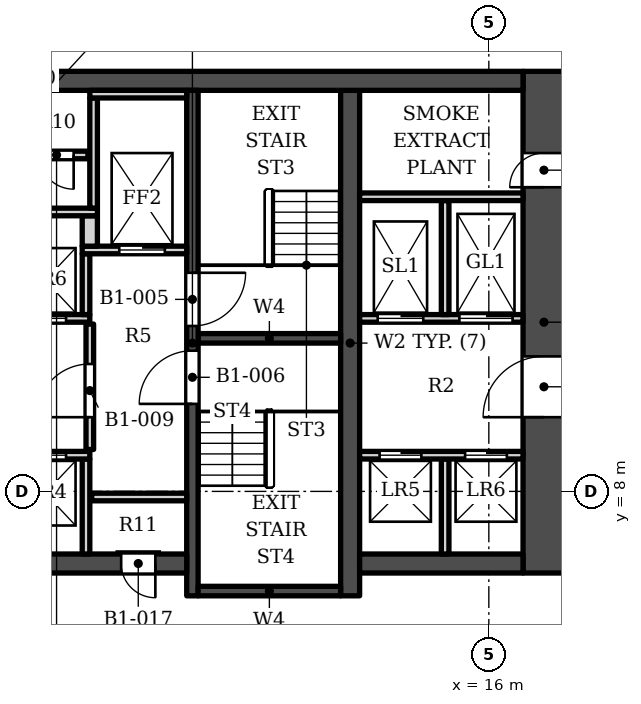
"""IFC4 building model, lengths in metres.
Left out: names, types, materials, properties, quantities, classifications, styles, units other than length and angle.
Written with IfcOpenShell. Run it as: python <this file> out.ifc"""

import sys

from ifc_helpers import new_model, si_unit, direction, frame, frame_2d, origin, place, context, subcontext, project, spatial, rectangle, extrude, element, fill, save


model = new_model("IFC4")
c1 = context("Model", 3, precision=1e-05, world=origin(), true_north=direction((0.0, 1.0)))
c2 = subcontext(c1, "Body", "Model", "MODEL_VIEW")
j1 = project(units=[si_unit("LENGTHUNIT", "METRE"), si_unit("PLANEANGLEUNIT", "RADIAN")], contexts=[c1])
p1 = place(None, origin())
s1 = spatial("IfcSite", under=j1, at=p1, CompositionType="ELEMENT")
p2 = place(p1, origin())
s2 = spatial("IfcBuilding", under=s1, at=p2, CompositionType="ELEMENT")
p3 = place(p2, frame((0.0, 0.0, -5.0)))
s3 = spatial("IfcBuildingStorey", under=s2, at=p3, CompositionType="ELEMENT", Elevation=-5.0)
p4 = place(p3, frame((-16.9, 18.802, 0.0), z_axis=(0.0, 0.0, 1.0), x_axis=(1.0, 0.0, 0.0)))
e1 = element("IfcWall", 1, at=p4, inside=s3, PredefinedType="SHEAR", context=c2, shape_type="SweptSolid", body=[
    extrude(rectangle(XDim=33.8, YDim=0.5, at=frame_2d((16.9, 0.0))), origin(), (0.0, 0.0, 1.0), 5.0),
])
p5 = place(p3, frame((12.35, 5.253, 0.0), z_axis=(0.0, 0.0, 1.0), x_axis=(0.0, 1.0, 0.0)))
e2 = element("IfcWall", 2, at=p5, inside=s3, PredefinedType="SHEAR", context=c2, shape_type="SweptSolid", body=[
    extrude(rectangle(XDim=13.3, YDim=0.5, at=frame_2d((6.65, 0.0))), origin(), (0.0, 0.0, 1.0), 5.0),
])
p6 = place(p3, frame((8.2, 5.253, 0.0), z_axis=(0.0, 0.0, 1.0), x_axis=(0.0, 1.0, 0.0)))
e3 = element("IfcWall", 3, at=p6, inside=s3, PredefinedType="SHEAR", context=c2, shape_type="SweptSolid", body=[
    extrude(rectangle(XDim=13.3, YDim=0.3, at=frame_2d((6.65, 0.0))), origin(), (0.0, 0.0, 1.0), 5.0),
])
p7 = place(p6, frame((7.1, 0.0, 0.0)))
e4 = element("IfcOpeningElement", 4, at=p7, cuts=e3, PredefinedType="OPENING", context=c2, shape_type="SweptSolid", body=[
    extrude(rectangle(XDim=1.4, YDim=2.1, at=frame_2d((0.7, 1.05))), frame((0.0, 0.16, 0.0), z_axis=(0.0, -1.0, 0.0), x_axis=(1.0, 0.0, 0.0)), (0.0, 0.0, 1.0), 0.32),
])
p8 = place(p6, frame((5.05, 0.0, 0.0)))
e5 = element("IfcOpeningElement", 5, at=p8, cuts=e3, PredefinedType="OPENING", context=c2, shape_type="SweptSolid", body=[
    extrude(rectangle(XDim=1.4, YDim=2.1, at=frame_2d((0.7, 1.05))), frame((0.0, 0.16, 0.0), z_axis=(0.0, -1.0, 0.0), x_axis=(1.0, 0.0, 0.0)), (0.0, 0.0, 1.0), 0.32),
])
for number, where, z_axis, x_axis in (
    (6, (8.35, 12.028, 0.0), (0.0, 0.0, 1.0), (1.0, 0.0, 0.0)),
    (7, (8.35, 5.378, 0.0), (0.0, 0.0, 1.0), (1.0, 0.0, 0.0)),
):
    element("IfcWall", number, at=place(p3, frame(where, z_axis=z_axis, x_axis=x_axis)), inside=s3, PredefinedType="SHEAR", context=c2, shape_type="SweptSolid", body=[
        extrude(rectangle(XDim=3.75, YDim=0.25, at=frame_2d((1.875, 0.0))), origin(), (0.0, 0.0, 1.0), 5.0),
    ])
p9 = place(p3, frame((1.0, 6.103, 0.0), z_axis=(0.0, 0.0, 1.0), x_axis=(1.0, 0.0, 0.0)))
e8 = element("IfcWall", 8, at=p9, inside=s3, PredefinedType="SHEAR", context=c2, shape_type="SweptSolid", body=[
    extrude(rectangle(XDim=7.05, YDim=0.5, at=frame_2d((3.525, 0.0))), origin(), (0.0, 0.0, 1.0), 5.0),
])
p10 = place(p9, frame((5.325, 0.0, 0.0)))
e9 = element("IfcOpeningElement", 9, at=p10, cuts=e8, PredefinedType="OPENING", context=c2, shape_type="SweptSolid", body=[
    extrude(rectangle(XDim=0.9, YDim=2.1, at=frame_2d((0.45, 1.05))), frame((0.0, 0.26, 0.0), z_axis=(0.0, -1.0, 0.0), x_axis=(1.0, 0.0, 0.0)), (0.0, 0.0, 1.0), 0.52),
])
p11 = place(p3, frame((12.6, 6.103, 0.0), z_axis=(0.0, 0.0, 1.0), x_axis=(1.0, 0.0, 0.0)))
e10 = element("IfcWall", 10, at=p11, inside=s3, PredefinedType="SHEAR", context=c2, shape_type="SweptSolid", body=[
    extrude(rectangle(XDim=4.3, YDim=0.5, at=frame_2d((2.15, 0.0))), origin(), (0.0, 0.0, 1.0), 5.0),
])
p12 = place(p3, frame((17.45, 5.853, 0.0), z_axis=(0.0, 0.0, 1.0), x_axis=(0.0, 1.0, 0.0)))
e11 = element("IfcWall", 11, at=p12, inside=s3, PredefinedType="SHEAR", context=c2, shape_type="SweptSolid", body=[
    extrude(rectangle(XDim=13.2, YDim=1.1, at=frame_2d((6.6, 0.0))), origin(), (0.0, 0.0, 1.0), 5.0),
])
p13 = place(p12, frame((4.1, 0.0, 0.0)))
e12 = element("IfcOpeningElement", 12, at=p13, cuts=e11, PredefinedType="OPENING", context=c2, shape_type="SweptSolid", body=[
    extrude(rectangle(XDim=1.6, YDim=2.1, at=frame_2d((0.8, 1.05))), frame((0.0, 0.56, 0.0), z_axis=(0.0, -1.0, 0.0), x_axis=(1.0, 0.0, 0.0)), (0.0, 0.0, 1.0), 1.12),
])
p14 = place(p12, frame((10.15, 0.0, 0.0)))
e13 = element("IfcOpeningElement", 13, at=p14, cuts=e11, PredefinedType="OPENING", context=c2, shape_type="SweptSolid", body=[
    extrude(rectangle(XDim=0.9, YDim=2.1, at=frame_2d((0.45, 1.05))), frame((0.0, 0.56, 0.0), z_axis=(0.0, -1.0, 0.0), x_axis=(1.0, 0.0, 0.0)), (0.0, 0.0, 1.0), 1.12),
])
for number, where, z_axis, x_axis in (
    (14, (5.4, 6.353, 0.0), (0.0, 0.0, 1.0), (0.0, 1.0, 0.0)),
    (15, (14.85, 6.353, 0.0), (0.0, 0.0, 1.0), (0.0, 1.0, 0.0)),
    (16, (5.55, 7.853, 0.0), (0.0, 0.0, 1.0), (1.0, 0.0, 0.0)),
):
    element("IfcWall", number, at=place(p3, frame(where, z_axis=z_axis, x_axis=x_axis)), inside=s3, PredefinedType="SOLIDWALL", context=c2, shape_type="SweptSolid", body=[
        extrude(rectangle(XDim=2.5, YDim=0.2, at=frame_2d((1.25, 0.0))), origin(), (0.0, 0.0, 1.0), 4.45),
    ])
p15 = place(p3, frame((1.0, 8.953, 0.0), z_axis=(0.0, 0.0, 1.0), x_axis=(1.0, 0.0, 0.0)))
e17 = element("IfcWall", 17, at=p15, inside=s3, PredefinedType="SOLIDWALL", context=c2, shape_type="SweptSolid", body=[
    extrude(rectangle(XDim=4.5, YDim=0.2, at=frame_2d((2.25, 0.0))), origin(), (0.0, 0.0, 1.0), 4.45),
])
p16 = place(p15, frame((0.625, 0.0, 0.0)))
e18 = element("IfcOpeningElement", 18, at=p16, cuts=e17, PredefinedType="OPENING", context=c2, shape_type="SweptSolid", body=[
    extrude(rectangle(XDim=1.1, YDim=2.1, at=frame_2d((0.55, 1.05))), frame((0.0, 0.11, 0.0), z_axis=(0.0, -1.0, 0.0), x_axis=(1.0, 0.0, 0.0)), (0.0, 0.0, 1.0), 0.22),
])
p17 = place(p15, frame((2.775, 0.0, 0.0)))
e19 = element("IfcOpeningElement", 19, at=p17, cuts=e17, PredefinedType="OPENING", context=c2, shape_type="SweptSolid", body=[
    extrude(rectangle(XDim=1.1, YDim=2.1, at=frame_2d((0.55, 1.05))), frame((0.0, 0.11, 0.0), z_axis=(0.0, -1.0, 0.0), x_axis=(1.0, 0.0, 0.0)), (0.0, 0.0, 1.0), 0.22),
])
p18 = place(p3, frame((12.6, 8.953, 0.0), z_axis=(0.0, 0.0, 1.0), x_axis=(1.0, 0.0, 0.0)))
e20 = element("IfcWall", 20, at=p18, inside=s3, PredefinedType="SOLIDWALL", context=c2, shape_type="SweptSolid", body=[
    extrude(rectangle(XDim=4.3, YDim=0.2, at=frame_2d((2.15, 0.0))), origin(), (0.0, 0.0, 1.0), 4.45),
])
p19 = place(p18, frame((0.525, 0.0, 0.0)))
e21 = element("IfcOpeningElement", 21, at=p19, cuts=e20, PredefinedType="OPENING", context=c2, shape_type="SweptSolid", body=[
    extrude(rectangle(XDim=1.1, YDim=2.1, at=frame_2d((0.55, 1.05))), frame((0.0, 0.11, 0.0), z_axis=(0.0, -1.0, 0.0), x_axis=(1.0, 0.0, 0.0)), (0.0, 0.0, 1.0), 0.22),
])
p20 = place(p18, frame((2.775, 0.0, 0.0)))
e22 = element("IfcOpeningElement", 22, at=p20, cuts=e20, PredefinedType="OPENING", context=c2, shape_type="SweptSolid", body=[
    extrude(rectangle(XDim=1.1, YDim=2.1, at=frame_2d((0.55, 1.05))), frame((0.0, 0.11, 0.0), z_axis=(0.0, -1.0, 0.0), x_axis=(1.0, 0.0, 0.0)), (0.0, 0.0, 1.0), 0.22),
])
p21 = place(p3, frame((5.5, 9.103, 0.0), z_axis=(0.0, 0.0, 1.0), x_axis=(0.0, 1.0, 0.0)))
e23 = element("IfcWall", 23, at=p21, inside=s3, PredefinedType="SOLIDWALL", context=c2, shape_type="SweptSolid", body=[
    extrude(rectangle(XDim=3.3, YDim=0.2, at=frame_2d((1.65, 0.0))), origin(), (0.0, 0.0, 1.0), 4.45),
])
p22 = place(p21, frame((0.85, 0.0, 0.0)))
e24 = element("IfcOpeningElement", 24, at=p22, cuts=e23, PredefinedType="OPENING", context=c2, shape_type="SweptSolid", body=[
    extrude(rectangle(XDim=1.4, YDim=2.1, at=frame_2d((0.7, 1.05))), frame((0.0, 0.11, 0.0), z_axis=(0.0, -1.0, 0.0), x_axis=(1.0, 0.0, 0.0)), (0.0, 0.0, 1.0), 0.22),
])
p23 = place(p3, frame((-1.5, 12.552, 0.0), z_axis=(0.0, 0.0, 1.0), x_axis=(1.0, 0.0, 0.0)))
e25 = element("IfcWall", 25, at=p23, inside=s3, PredefinedType="SOLIDWALL", context=c2, shape_type="SweptSolid", body=[
    extrude(rectangle(XDim=7.0, YDim=0.2, at=frame_2d((3.5, 0.0))), origin(), (0.0, 0.0, 1.0), 4.45),
])
p24 = place(p23, frame((3.075, 0.0, 0.0)))
e26 = element("IfcOpeningElement", 26, at=p24, cuts=e25, PredefinedType="OPENING", context=c2, shape_type="SweptSolid", body=[
    extrude(rectangle(XDim=1.1, YDim=2.1, at=frame_2d((0.55, 1.05))), frame((0.0, 0.11, 0.0), z_axis=(0.0, -1.0, 0.0), x_axis=(1.0, 0.0, 0.0)), (0.0, 0.0, 1.0), 0.22),
])
p25 = place(p23, frame((5.275, 0.0, 0.0)))
e27 = element("IfcOpeningElement", 27, at=p25, cuts=e25, PredefinedType="OPENING", context=c2, shape_type="SweptSolid", body=[
    extrude(rectangle(XDim=1.1, YDim=2.1, at=frame_2d((0.55, 1.05))), frame((0.0, 0.11, 0.0), z_axis=(0.0, -1.0, 0.0), x_axis=(1.0, 0.0, 0.0)), (0.0, 0.0, 1.0), 0.22),
])
p26 = place(p3, frame((12.6, 12.552, 0.0), z_axis=(0.0, 0.0, 1.0), x_axis=(1.0, 0.0, 0.0)))
e28 = element("IfcWall", 28, at=p26, inside=s3, PredefinedType="SOLIDWALL", context=c2, shape_type="SweptSolid", body=[
    extrude(rectangle(XDim=4.3, YDim=0.2, at=frame_2d((2.15, 0.0))), origin(), (0.0, 0.0, 1.0), 4.45),
])
p27 = place(p26, frame((0.475, 0.0, 0.0)))
e29 = element("IfcOpeningElement", 29, at=p27, cuts=e28, PredefinedType="OPENING", context=c2, shape_type="SweptSolid", body=[
    extrude(rectangle(XDim=1.2, YDim=2.1, at=frame_2d((0.6, 1.05))), frame((0.0, 0.11, 0.0), z_axis=(0.0, -1.0, 0.0), x_axis=(1.0, 0.0, 0.0)), (0.0, 0.0, 1.0), 0.22),
])
p28 = place(p26, frame((2.625, 0.0, 0.0)))
e30 = element("IfcOpeningElement", 30, at=p28, cuts=e28, PredefinedType="OPENING", context=c2, shape_type="SweptSolid", body=[
    extrude(rectangle(XDim=1.4, YDim=2.1, at=frame_2d((0.7, 1.05))), frame((0.0, 0.11, 0.0), z_axis=(0.0, -1.0, 0.0), x_axis=(1.0, 0.0, 0.0)), (0.0, 0.0, 1.0), 0.22),
])
p29 = place(p3, frame((5.4, 12.653, 0.0), z_axis=(0.0, 0.0, 1.0), x_axis=(0.0, 1.0, 0.0)))
e31 = element("IfcWall", 31, at=p29, inside=s3, PredefinedType="SOLIDWALL", context=c2, shape_type="SweptSolid", body=[
    extrude(rectangle(XDim=1.6, YDim=0.2, at=frame_2d((0.8, 0.0))), origin(), (0.0, 0.0, 1.0), 4.45),
])
p30 = place(p3, frame((14.85, 12.653, 0.0), z_axis=(0.0, 0.0, 1.0), x_axis=(0.0, 1.0, 0.0)))
e32 = element("IfcWall", 32, at=p30, inside=s3, PredefinedType="SOLIDWALL", context=c2, shape_type="SweptSolid", body=[
    extrude(rectangle(XDim=3.0, YDim=0.2, at=frame_2d((1.5, 0.0))), origin(), (0.0, 0.0, 1.0), 4.45),
])
p31 = place(p3, frame((5.3, 14.353, 0.0), z_axis=(0.0, 0.0, 1.0), x_axis=(1.0, 0.0, 0.0)))
e33 = element("IfcWall", 33, at=p31, inside=s3, PredefinedType="SOLIDWALL", context=c2, shape_type="SweptSolid", body=[
    extrude(rectangle(XDim=2.75, YDim=0.2, at=frame_2d((1.375, 0.0))), origin(), (0.0, 0.0, 1.0), 4.45),
])
p32 = place(p31, frame((0.975, 0.0, 0.0)))
e34 = element("IfcOpeningElement", 34, at=p32, cuts=e33, PredefinedType="OPENING", context=c2, shape_type="SweptSolid", body=[
    extrude(rectangle(XDim=1.2, YDim=2.1, at=frame_2d((0.6, 1.05))), frame((0.0, 0.11, 0.0), z_axis=(0.0, -1.0, 0.0), x_axis=(1.0, 0.0, 0.0)), (0.0, 0.0, 1.0), 0.22),
])
p33 = place(p3, frame((5.5, 14.453, 0.0), z_axis=(0.0, 0.0, 1.0), x_axis=(0.0, 1.0, 0.0)))
e35 = element("IfcWall", 35, at=p33, inside=s3, PredefinedType="SOLIDWALL", context=c2, shape_type="SweptSolid", body=[
    extrude(rectangle(XDim=0.8, YDim=0.4, at=frame_2d((0.4, 0.0))), origin(), (0.0, 0.0, 1.0), 4.45),
])
p34 = place(p3, frame((-1.5, 15.353, 0.0), z_axis=(0.0, 0.0, 1.0), x_axis=(1.0, 0.0, 0.0)))
e36 = element("IfcWall", 36, at=p34, inside=s3, PredefinedType="SOLIDWALL", context=c2, shape_type="SweptSolid", body=[
    extrude(rectangle(XDim=7.2, YDim=0.2, at=frame_2d((3.6, 0.0))), origin(), (0.0, 0.0, 1.0), 4.45),
])
p35 = place(p3, frame((5.6, 15.453, 0.0), z_axis=(0.0, 0.0, 1.0), x_axis=(0.0, 1.0, 0.0)))
e37 = element("IfcWall", 37, at=p35, inside=s3, PredefinedType="SOLIDWALL", context=c2, shape_type="SweptSolid", body=[
    extrude(rectangle(XDim=2.9, YDim=0.2, at=frame_2d((1.45, 0.0))), origin(), (0.0, 0.0, 1.0), 4.45),
])
p36 = place(p3, frame((12.6, 15.753, 0.0), z_axis=(0.0, 0.0, 1.0), x_axis=(1.0, 0.0, 0.0)))
e38 = element("IfcWall", 38, at=p36, inside=s3, PredefinedType="SOLIDWALL", context=c2, shape_type="SweptSolid", body=[
    extrude(rectangle(XDim=4.3, YDim=0.2, at=frame_2d((2.15, 0.0))), origin(), (0.0, 0.0, 1.0), 4.45),
])
p37 = place(p3, frame((-1.6, 16.853, 0.0), z_axis=(0.0, 0.0, 1.0), x_axis=(1.0, 0.0, 0.0)))
e39 = element("IfcWall", 39, at=p37, inside=s3, PredefinedType="SOLIDWALL", context=c2, shape_type="SweptSolid", body=[
    extrude(rectangle(XDim=7.05, YDim=0.2, at=frame_2d((3.525, 0.0))), origin(), (0.0, 0.0, 1.0), 4.45),
])
p38 = place(p37, frame((0.525, 0.0, 0.0)))
e40 = element("IfcOpeningElement", 40, at=p38, cuts=e39, PredefinedType="OPENING", context=c2, shape_type="SweptSolid", body=[
    extrude(rectangle(XDim=0.9, YDim=2.1, at=frame_2d((0.45, 1.05))), frame((0.0, 0.11, 0.0), z_axis=(0.0, -1.0, 0.0), x_axis=(1.0, 0.0, 0.0)), (0.0, 0.0, 1.0), 0.22),
])
p39 = place(p37, frame((2.275, 0.0, 0.0)))
e41 = element("IfcOpeningElement", 41, at=p39, cuts=e39, PredefinedType="OPENING", context=c2, shape_type="SweptSolid", body=[
    extrude(rectangle(XDim=0.9, YDim=2.1, at=frame_2d((0.45, 1.05))), frame((0.0, 0.11, 0.0), z_axis=(0.0, -1.0, 0.0), x_axis=(1.0, 0.0, 0.0)), (0.0, 0.0, 1.0), 0.22),
])
p40 = place(p37, frame((4.025, 0.0, 0.0)))
e42 = element("IfcOpeningElement", 42, at=p40, cuts=e39, PredefinedType="OPENING", context=c2, shape_type="SweptSolid", body=[
    extrude(rectangle(XDim=0.9, YDim=2.1, at=frame_2d((0.45, 1.05))), frame((0.0, 0.11, 0.0), z_axis=(0.0, -1.0, 0.0), x_axis=(1.0, 0.0, 0.0)), (0.0, 0.0, 1.0), 0.22),
])
p41 = place(p37, frame((5.775, 0.0, 0.0)))
e43 = element("IfcOpeningElement", 43, at=p41, cuts=e39, PredefinedType="OPENING", context=c2, shape_type="SweptSolid", body=[
    extrude(rectangle(XDim=0.9, YDim=2.1, at=frame_2d((0.45, 1.05))), frame((0.0, 0.11, 0.0), z_axis=(0.0, -1.0, 0.0), x_axis=(1.0, 0.0, 0.0)), (0.0, 0.0, 1.0), 0.22),
])
p42 = place(p3, frame((5.5, 18.453, 0.0), z_axis=(0.0, 0.0, 1.0), x_axis=(1.0, 0.0, 0.0)))
e44 = element("IfcWall", 44, at=p42, inside=s3, PredefinedType="SOLIDWALL", context=c2, shape_type="SweptSolid", body=[
    extrude(rectangle(XDim=2.55, YDim=0.2, at=frame_2d((1.275, 0.0))), origin(), (0.0, 0.0, 1.0), 4.45),
])
p43 = place(p17, origin())
e45 = element("IfcDoor", 45, at=p43, inside=s3, OperationType="DOUBLE_DOOR_SLIDING", PredefinedType="DOOR", context=c2, shape_type="SweptSolid", body=[
    extrude(rectangle(XDim=1.1, YDim=2.1, at=frame_2d((0.55, 1.05))), frame((0.0, 0.025, 0.0), z_axis=(0.0, -1.0, 0.0), x_axis=(1.0, 0.0, 0.0)), (0.0, 0.0, 1.0), 0.05),
])
fill(e19, e45)
p44 = place(p25, origin())
e46 = element("IfcDoor", 46, at=p44, inside=s3, OperationType="DOUBLE_DOOR_SLIDING", PredefinedType="DOOR", context=c2, shape_type="SweptSolid", body=[
    extrude(rectangle(XDim=1.1, YDim=2.1, at=frame_2d((0.55, 1.05))), frame((0.0, 0.025, 0.0), z_axis=(0.0, -1.0, 0.0), x_axis=(1.0, 0.0, 0.0)), (0.0, 0.0, 1.0), 0.05),
])
fill(e27, e46)
p45 = place(p32, origin())
e47 = element("IfcDoor", 47, at=p45, inside=s3, OperationType="DOUBLE_DOOR_SLIDING", PredefinedType="DOOR", context=c2, shape_type="SweptSolid", body=[
    extrude(rectangle(XDim=1.2, YDim=2.1, at=frame_2d((0.6, 1.05))), frame((0.0, 0.025, 0.0), z_axis=(0.0, -1.0, 0.0), x_axis=(1.0, 0.0, 0.0)), (0.0, 0.0, 1.0), 0.05),
])
fill(e34, e47)
p46 = place(p19, origin())
e48 = element("IfcDoor", 48, at=p46, inside=s3, OperationType="DOUBLE_DOOR_SLIDING", PredefinedType="DOOR", context=c2, shape_type="SweptSolid", body=[
    extrude(rectangle(XDim=1.1, YDim=2.1, at=frame_2d((0.55, 1.05))), frame((0.0, 0.025, 0.0), z_axis=(0.0, -1.0, 0.0), x_axis=(1.0, 0.0, 0.0)), (0.0, 0.0, 1.0), 0.05),
])
fill(e21, e48)
p47 = place(p20, origin())
e49 = element("IfcDoor", 49, at=p47, inside=s3, OperationType="DOUBLE_DOOR_SLIDING", PredefinedType="DOOR", context=c2, shape_type="SweptSolid", body=[
    extrude(rectangle(XDim=1.1, YDim=2.1, at=frame_2d((0.55, 1.05))), frame((0.0, 0.025, 0.0), z_axis=(0.0, -1.0, 0.0), x_axis=(1.0, 0.0, 0.0)), (0.0, 0.0, 1.0), 0.05),
])
fill(e22, e49)
p48 = place(p27, origin())
e50 = element("IfcDoor", 50, at=p48, inside=s3, OperationType="DOUBLE_DOOR_SLIDING", PredefinedType="DOOR", context=c2, shape_type="SweptSolid", body=[
    extrude(rectangle(XDim=1.2, YDim=2.1, at=frame_2d((0.6, 1.05))), frame((0.0, 0.025, 0.0), z_axis=(0.0, -1.0, 0.0), x_axis=(1.0, 0.0, 0.0)), (0.0, 0.0, 1.0), 0.05),
])
fill(e29, e50)
p49 = place(p28, origin())
e51 = element("IfcDoor", 51, at=p49, inside=s3, OperationType="DOUBLE_DOOR_SLIDING", PredefinedType="DOOR", context=c2, shape_type="SweptSolid", body=[
    extrude(rectangle(XDim=1.4, YDim=2.1, at=frame_2d((0.7, 1.05))), frame((0.0, 0.025, 0.0), z_axis=(0.0, -1.0, 0.0), x_axis=(1.0, 0.0, 0.0)), (0.0, 0.0, 1.0), 0.05),
])
fill(e30, e51)
p50 = place(p7, origin())
e52 = element("IfcDoor", 52, at=p50, inside=s3, OperationType="SINGLE_SWING_RIGHT", PredefinedType="DOOR", context=c2, shape_type="SweptSolid", body=[
    extrude(rectangle(XDim=1.4, YDim=2.1, at=frame_2d((0.7, 1.05))), frame((0.0, 0.025, 0.0), z_axis=(0.0, -1.0, 0.0), x_axis=(1.0, 0.0, 0.0)), (0.0, 0.0, 1.0), 0.05),
])
fill(e4, e52)
p51 = place(p8, origin())
e53 = element("IfcDoor", 53, at=p51, inside=s3, OperationType="SINGLE_SWING_LEFT", PredefinedType="DOOR", context=c2, shape_type="SweptSolid", body=[
    extrude(rectangle(XDim=1.4, YDim=2.1, at=frame_2d((0.7, 1.05))), frame((0.0, 0.025, 0.0), z_axis=(0.0, -1.0, 0.0), x_axis=(1.0, 0.0, 0.0)), (0.0, 0.0, 1.0), 0.05),
])
fill(e5, e53)
p52 = place(p22, origin())
e54 = element("IfcDoor", 54, at=p52, inside=s3, OperationType="SINGLE_SWING_LEFT", PredefinedType="DOOR", context=c2, shape_type="SweptSolid", body=[
    extrude(rectangle(XDim=1.4, YDim=2.1, at=frame_2d((0.7, 1.05))), frame((0.0, 0.025, 0.0), z_axis=(0.0, -1.0, 0.0), x_axis=(1.0, 0.0, 0.0)), (0.0, 0.0, 1.0), 0.05),
])
fill(e24, e54)
p53 = place(p41, origin())
e55 = element("IfcDoor", 55, at=p53, inside=s3, OperationType="SINGLE_SWING_RIGHT", PredefinedType="DOOR", context=c2, shape_type="SweptSolid", body=[
    extrude(rectangle(XDim=0.9, YDim=2.1, at=frame_2d((0.45, 1.05))), frame((0.0, 0.025, 0.0), z_axis=(0.0, -1.0, 0.0), x_axis=(1.0, 0.0, 0.0)), (0.0, 0.0, 1.0), 0.05),
])
fill(e43, e55)
p54 = place(p10, origin())
e56 = element("IfcDoor", 56, at=p54, inside=s3, OperationType="SINGLE_SWING_RIGHT", PredefinedType="DOOR", context=c2, shape_type="SweptSolid", body=[
    extrude(rectangle(XDim=0.9, YDim=2.1, at=frame_2d((0.45, 1.05))), frame((0.0, 0.025, 0.0), z_axis=(0.0, -1.0, 0.0), x_axis=(1.0, 0.0, 0.0)), (0.0, 0.0, 1.0), 0.05),
])
fill(e9, e56)
p55 = place(p13, origin())
e57 = element("IfcDoor", 57, at=p55, inside=s3, OperationType="DOUBLE_DOOR_SINGLE_SWING", PredefinedType="DOOR", context=c2, shape_type="SweptSolid", body=[
    extrude(rectangle(XDim=1.6, YDim=2.1, at=frame_2d((0.8, 1.05))), frame((0.0, 0.275, 0.0), z_axis=(0.0, -1.0, 0.0), x_axis=(1.0, 0.0, 0.0)), (0.0, 0.0, 1.0), 0.05),
])
fill(e12, e57)
p56 = place(p14, origin())
e58 = element("IfcDoor", 58, at=p56, inside=s3, OperationType="SINGLE_SWING_LEFT", PredefinedType="DOOR", context=c2, shape_type="SweptSolid", body=[
    extrude(rectangle(XDim=0.9, YDim=2.1, at=frame_2d((0.45, 1.05))), frame((0.0, 0.275, 0.0), z_axis=(0.0, -1.0, 0.0), x_axis=(1.0, 0.0, 0.0)), (0.0, 0.0, 1.0), 0.05),
])
fill(e13, e58)
save(model, sys.argv[1])
